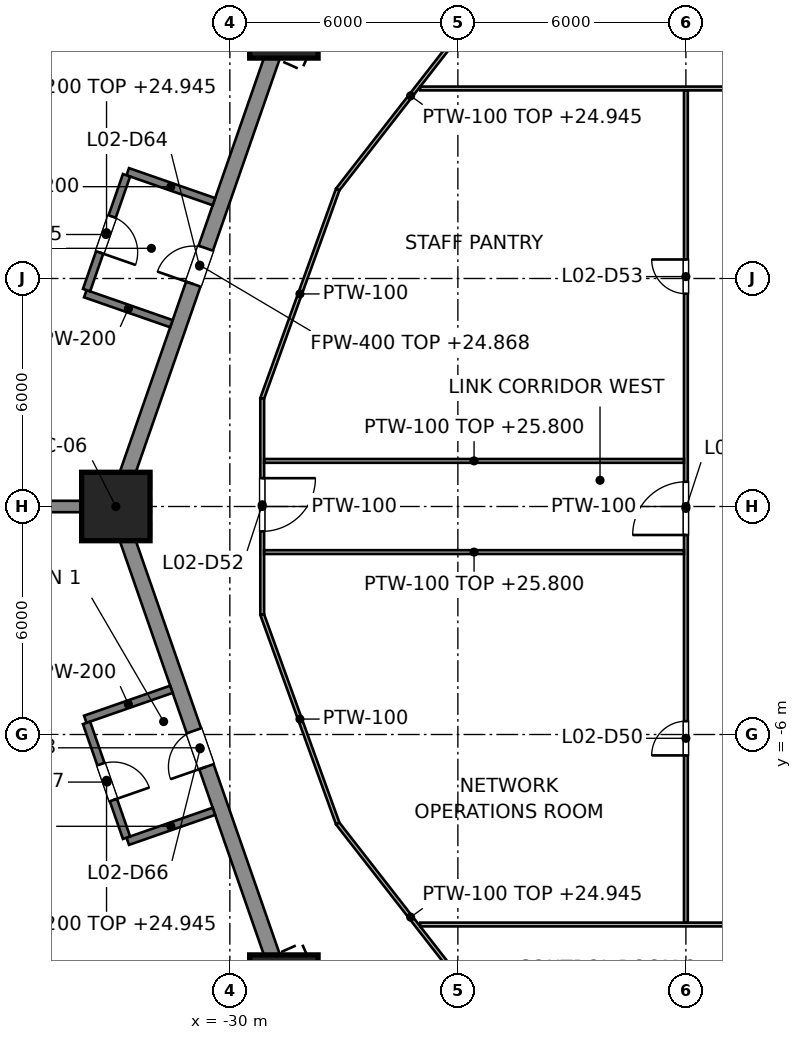
"""IFC4 building model, lengths in metres.
Left out: names, types, materials, properties, quantities, classifications, styles, units other than length and angle.
Written with IfcOpenShell. Run it as: python <this file> out.ifc"""

import sys

from ifc_helpers import new_model, si_unit, direction, frame, frame_2d, origin, origin_2d, place, context, subcontext, project, spatial, rectangle, hollow_rectangle, extrude, element, fill, save


model = new_model("IFC4")
c1 = context("Model", 3, precision=1e-05, world=origin(), true_north=direction((0.0, 1.0)))
c2 = subcontext(c1, "Body", "Model", "MODEL_VIEW")
j1 = project(units=[si_unit("LENGTHUNIT", "METRE"), si_unit("PLANEANGLEUNIT", "RADIAN")], contexts=[c1])
p1 = place(None, origin())
s1 = spatial("IfcSite", under=j1, at=p1, CompositionType="ELEMENT")
p2 = place(p1, origin())
s2 = spatial("IfcBuilding", under=s1, at=p2, CompositionType="ELEMENT")
p3 = place(p2, frame((0.0, 0.0, 17.0)))
s3 = spatial("IfcBuildingStorey", under=s2, at=p3, CompositionType="ELEMENT", Elevation=17.0)
for number, where, z_axis, x_axis in (
    (1, (-28.579, 12.7, 0.0), (0.0, 0.0, 1.0), (-0.914, 0.406, 0.0)),
    (2, (-33.0, 0.0, 0.0), (0.0, 0.0, 1.0), (-1.0, 0.0, 0.0)),
    (3, (-28.579, -12.7, 0.0), (0.0, 0.0, 1.0), (-0.914, -0.406, 0.0)),
):
    element("IfcColumn", number, at=place(p3, frame(where, z_axis=z_axis, x_axis=x_axis)), inside=s3, PredefinedType="COLUMN", context=c2, shape_type="SweptSolid", body=[
        extrude(hollow_rectangle(XDim=1.8, YDim=1.8, WallThickness=0.08, at=origin_2d()), origin(), (0.0, 0.0, 1.0), 9.0),
    ])
p4 = place(p3, frame((-28.579, 12.7, 0.0), z_axis=(0.0, 0.0, 1.0), x_axis=(-0.328770590399, -0.944409815117, 0.0)))
e4 = element("IfcWall", 4, at=p4, inside=s3, PredefinedType="PARTITIONING", context=c2, shape_type="SweptSolid", body=[
    extrude(rectangle(XDim=13.448, YDim=0.4, at=frame_2d((6.724, 0.0))), origin(), (0.0, 0.0, 1.0), 7.868),
])
p5 = place(p4, frame((6.25, 0.0, 0.0)))
e5 = element("IfcOpeningElement", 5, at=p5, cuts=e4, PredefinedType="OPENING", context=c2, shape_type="SweptSolid", body=[
    extrude(rectangle(XDim=1.0, YDim=2.1, at=frame_2d((0.5, 1.05))), frame((0.0, 0.2, 0.0), z_axis=(0.0, -1.0, 0.0), x_axis=(1.0, 0.0, 0.0)), (0.0, 0.0, 1.0), 0.4),
])
p6 = place(p3, frame((-33.0, 0.0, 0.0), z_axis=(0.0, 0.0, 1.0), x_axis=(0.328770590399, -0.944409815117, 0.0)))
e6 = element("IfcWall", 6, at=p6, inside=s3, PredefinedType="PARTITIONING", context=c2, shape_type="SweptSolid", body=[
    extrude(rectangle(XDim=13.448, YDim=0.4, at=frame_2d((6.724, 0.0))), origin(), (0.0, 0.0, 1.0), 7.868),
])
p7 = place(p6, frame((6.25, 0.0, 0.0)))
e7 = element("IfcOpeningElement", 7, at=p7, cuts=e6, PredefinedType="OPENING", context=c2, shape_type="SweptSolid", body=[
    extrude(rectangle(XDim=1.0, YDim=2.1, at=frame_2d((0.5, 1.05))), frame((0.0, 0.2, 0.0), z_axis=(0.0, -1.0, 0.0), x_axis=(1.0, 0.0, 0.0)), (0.0, 0.0, 1.0), 0.4),
])
p8 = place(p3, frame((-23.325, 13.271, 0.0), z_axis=(0.0, 0.0, 1.0), x_axis=(-0.614354540541, -0.78903009988, 0.0)))
e8 = element("IfcWall", 8, at=p8, inside=s3, PredefinedType="PARTITIONING", context=c2, shape_type="SweptSolid", body=[
    extrude(rectangle(XDim=6.246, YDim=0.1, at=frame_2d((3.123, 0.0))), origin(), (0.0, 0.0, 1.0), 7.945),
])
p9 = place(p3, frame((-27.162, 8.343, 0.0), z_axis=(0.0, 0.0, 1.0), x_axis=(-0.339837423604, -0.940484197378, 0.0)))
e9 = element("IfcWall", 9, at=p9, inside=s3, PredefinedType="PARTITIONING", context=c2, shape_type="SweptSolid", body=[
    extrude(rectangle(XDim=5.845, YDim=0.1, at=frame_2d((2.922, 0.0))), origin(), (0.0, 0.0, 1.0), 7.877),
])
p10 = place(p3, frame((-29.148, 2.845, 0.0), z_axis=(0.0, 0.0, 1.0), x_axis=(0.0, -1.0, 0.0)))
e10 = element("IfcWall", 10, at=p10, inside=s3, PredefinedType="PARTITIONING", context=c2, shape_type="SweptSolid", body=[
    extrude(rectangle(XDim=5.691, YDim=0.1, at=frame_2d((2.845, 0.0))), origin(), (0.0, 0.0, 1.0), 7.877),
])
p11 = place(p10, frame((2.1, 0.0, 0.0)))
e11 = element("IfcOpeningElement", 11, at=p11, cuts=e10, PredefinedType="OPENING", context=c2, shape_type="SweptSolid", body=[
    extrude(rectangle(XDim=1.4, YDim=2.1, at=frame_2d((0.7, 1.05))), frame((0.0, 0.05, 0.0), z_axis=(0.0, -1.0, 0.0), x_axis=(1.0, 0.0, 0.0)), (0.0, 0.0, 1.0), 0.1),
])
p12 = place(p3, frame((-29.148, -2.845, 0.0), z_axis=(0.0, 0.0, 1.0), x_axis=(0.339837423604, -0.940484197378, 0.0)))
e12 = element("IfcWall", 12, at=p12, inside=s3, PredefinedType="PARTITIONING", context=c2, shape_type="SweptSolid", body=[
    extrude(rectangle(XDim=5.845, YDim=0.1, at=frame_2d((2.922, 0.0))), origin(), (0.0, 0.0, 1.0), 7.877),
])
p13 = place(p3, frame((-27.162, -8.343, 0.0), z_axis=(0.0, 0.0, 1.0), x_axis=(0.614354540541, -0.78903009988, 0.0)))
e13 = element("IfcWall", 13, at=p13, inside=s3, PredefinedType="PARTITIONING", context=c2, shape_type="SweptSolid", body=[
    extrude(rectangle(XDim=6.246, YDim=0.1, at=frame_2d((3.123, 0.0))), origin(), (0.0, 0.0, 1.0), 7.945),
])
p14 = place(p3, frame((-24.99, 11.0, 0.0), z_axis=(0.0, 0.0, 1.0), x_axis=(1.0, 0.0, 0.0)))
e14 = element("IfcWall", 14, at=p14, inside=s3, PredefinedType="PARTITIONING", context=c2, shape_type="SweptSolid", body=[
    extrude(rectangle(XDim=49.981, YDim=0.1, at=frame_2d((24.99, 0.0))), origin(), (0.0, 0.0, 1.0), 7.877),
])
p15 = place(p14, frame((11.05, 0.0, 0.0)))
e15 = element("IfcOpeningElement", 15, at=p15, cuts=e14, PredefinedType="OPENING", context=c2, shape_type="SweptSolid", body=[
    extrude(rectangle(XDim=0.9, YDim=2.1, at=frame_2d((0.45, 1.05))), frame((0.0, 0.05, 0.0), z_axis=(0.0, -1.0, 0.0), x_axis=(1.0, 0.0, 0.0)), (0.0, 0.0, 1.0), 0.1),
])
p16 = place(p14, frame((19.45, 0.0, 0.0)))
e16 = element("IfcOpeningElement", 16, at=p16, cuts=e14, PredefinedType="OPENING", context=c2, shape_type="SweptSolid", body=[
    extrude(rectangle(XDim=0.9, YDim=2.1, at=frame_2d((0.45, 1.05))), frame((0.0, 0.05, 0.0), z_axis=(0.0, -1.0, 0.0), x_axis=(1.0, 0.0, 0.0)), (0.0, 0.0, 1.0), 0.1),
])
p17 = place(p14, frame((24.3, 0.0, 0.0)))
e17 = element("IfcOpeningElement", 17, at=p17, cuts=e14, PredefinedType="OPENING", context=c2, shape_type="SweptSolid", body=[
    extrude(rectangle(XDim=1.4, YDim=2.1, at=frame_2d((0.7, 1.05))), frame((0.0, 0.05, 0.0), z_axis=(0.0, -1.0, 0.0), x_axis=(1.0, 0.0, 0.0)), (0.0, 0.0, 1.0), 0.1),
])
p18 = place(p14, frame((32.9, 0.0, 0.0)))
e18 = element("IfcOpeningElement", 18, at=p18, cuts=e14, PredefinedType="OPENING", context=c2, shape_type="SweptSolid", body=[
    extrude(rectangle(XDim=0.9, YDim=2.1, at=frame_2d((0.45, 1.05))), frame((0.0, 0.05, 0.0), z_axis=(0.0, -1.0, 0.0), x_axis=(1.0, 0.0, 0.0)), (0.0, 0.0, 1.0), 0.1),
])
p19 = place(p14, frame((41.3, 0.0, 0.0)))
e19 = element("IfcOpeningElement", 19, at=p19, cuts=e14, PredefinedType="OPENING", context=c2, shape_type="SweptSolid", body=[
    extrude(rectangle(XDim=0.9, YDim=2.1, at=frame_2d((0.45, 1.05))), frame((0.0, 0.05, 0.0), z_axis=(0.0, -1.0, 0.0), x_axis=(1.0, 0.0, 0.0)), (0.0, 0.0, 1.0), 0.1),
])
p20 = place(p3, frame((-24.99, -11.0, 0.0), z_axis=(0.0, 0.0, 1.0), x_axis=(1.0, 0.0, 0.0)))
e20 = element("IfcWall", 20, at=p20, inside=s3, PredefinedType="PARTITIONING", context=c2, shape_type="SweptSolid", body=[
    extrude(rectangle(XDim=49.981, YDim=0.1, at=frame_2d((24.99, 0.0))), origin(), (0.0, 0.0, 1.0), 7.877),
])
p21 = place(p20, frame((15.7, 0.0, 0.0)))
e21 = element("IfcOpeningElement", 21, at=p21, cuts=e20, PredefinedType="OPENING", context=c2, shape_type="SweptSolid", body=[
    extrude(rectangle(XDim=0.9, YDim=2.1, at=frame_2d((0.45, 1.05))), frame((0.0, 0.05, 0.0), z_axis=(0.0, -1.0, 0.0), x_axis=(1.0, 0.0, 0.0)), (0.0, 0.0, 1.0), 0.1),
])
p22 = place(p20, frame((24.3, 0.0, 0.0)))
e22 = element("IfcOpeningElement", 22, at=p22, cuts=e20, PredefinedType="OPENING", context=c2, shape_type="SweptSolid", body=[
    extrude(rectangle(XDim=1.4, YDim=2.1, at=frame_2d((0.7, 1.05))), frame((0.0, 0.05, 0.0), z_axis=(0.0, -1.0, 0.0), x_axis=(1.0, 0.0, 0.0)), (0.0, 0.0, 1.0), 0.1),
])
p23 = place(p20, frame((30.65, 0.0, 0.0)))
e23 = element("IfcOpeningElement", 23, at=p23, cuts=e20, PredefinedType="OPENING", context=c2, shape_type="SweptSolid", body=[
    extrude(rectangle(XDim=0.9, YDim=2.1, at=frame_2d((0.45, 1.05))), frame((0.0, 0.05, 0.0), z_axis=(0.0, -1.0, 0.0), x_axis=(1.0, 0.0, 0.0)), (0.0, 0.0, 1.0), 0.1),
])
p24 = place(p20, frame((39.05, 0.0, 0.0)))
e24 = element("IfcOpeningElement", 24, at=p24, cuts=e20, PredefinedType="OPENING", context=c2, shape_type="SweptSolid", body=[
    extrude(rectangle(XDim=0.9, YDim=2.1, at=frame_2d((0.45, 1.05))), frame((0.0, 0.05, 0.0), z_axis=(0.0, -1.0, 0.0), x_axis=(1.0, 0.0, 0.0)), (0.0, 0.0, 1.0), 0.1),
])
p25 = place(p3, frame((-18.0, -10.95, 0.0), z_axis=(0.0, 0.0, 1.0), x_axis=(0.0, 1.0, 0.0)))
e25 = element("IfcWall", 25, at=p25, inside=s3, PredefinedType="PARTITIONING", context=c2, shape_type="SweptSolid", body=[
    extrude(rectangle(XDim=21.9, YDim=0.1, at=frame_2d((10.95, 0.0))), origin(), (0.0, 0.0, 1.0), 7.877),
])
p26 = place(p25, frame((4.4, 0.0, 0.0)))
e26 = element("IfcOpeningElement", 26, at=p26, cuts=e25, PredefinedType="OPENING", context=c2, shape_type="SweptSolid", body=[
    extrude(rectangle(XDim=0.9, YDim=2.1, at=frame_2d((0.45, 1.05))), frame((0.0, 0.05, 0.0), z_axis=(0.0, -1.0, 0.0), x_axis=(1.0, 0.0, 0.0)), (0.0, 0.0, 1.0), 0.1),
])
p27 = place(p25, frame((10.2, 0.0, 0.0)))
e27 = element("IfcOpeningElement", 27, at=p27, cuts=e25, PredefinedType="OPENING", context=c2, shape_type="SweptSolid", body=[
    extrude(rectangle(XDim=1.4, YDim=2.1, at=frame_2d((0.7, 1.05))), frame((0.0, 0.05, 0.0), z_axis=(0.0, -1.0, 0.0), x_axis=(1.0, 0.0, 0.0)), (0.0, 0.0, 1.0), 0.1),
])
p28 = place(p25, frame((16.55, 0.0, 0.0)))
e28 = element("IfcOpeningElement", 28, at=p28, cuts=e25, PredefinedType="OPENING", context=c2, shape_type="SweptSolid", body=[
    extrude(rectangle(XDim=0.9, YDim=2.1, at=frame_2d((0.45, 1.05))), frame((0.0, 0.05, 0.0), z_axis=(0.0, -1.0, 0.0), x_axis=(1.0, 0.0, 0.0)), (0.0, 0.0, 1.0), 0.1),
])
for number, where, z_axis, x_axis in (
    (29, (-18.05, -1.2, 0.0), (0.0, 0.0, 1.0), (-1.0, 0.0, 0.0)),
    (30, (-18.05, 1.2, 0.0), (0.0, 0.0, 1.0), (-1.0, 0.0, 0.0)),
):
    element("IfcWall", number, at=place(p3, frame(where, z_axis=z_axis, x_axis=x_axis)), inside=s3, PredefinedType="PARTITIONING", context=c2, shape_type="SweptSolid", body=[
        extrude(rectangle(XDim=11.048, YDim=0.1, at=frame_2d((5.524, 0.0))), origin(), (0.0, 0.0, 1.0), 8.8),
    ])
p29 = place(p3, frame((-33.2, 0.0, 0.0), z_axis=(0.0, 0.0, 1.0), x_axis=(-1.0, 0.0, 0.0)))
e31 = element("IfcWall", 31, at=p29, inside=s3, PredefinedType="PARTITIONING", context=c2, shape_type="SweptSolid", body=[
    extrude(rectangle(XDim=14.598, YDim=0.3, at=frame_2d((7.299, 0.0))), origin(), (0.0, 0.0, 1.0), 8.026),
])
for number, where, z_axis, x_axis in (
    (32, (-30.419, 8.021, 0.0), (0.0, 0.0, 1.0), (-0.944, 0.329, 0.0)),
    (33, (-31.537, 4.81, 0.0), (0.0, 0.0, 1.0), (-0.944, 0.329, 0.0)),
):
    element("IfcWall", number, at=place(p3, frame(where, z_axis=z_axis, x_axis=x_axis)), inside=s3, PredefinedType="PARTITIONING", context=c2, shape_type="SweptSolid", body=[
        extrude(rectangle(XDim=2.4, YDim=0.2, at=frame_2d((1.2, 0.0))), origin(), (0.0, 0.0, 1.0), 8.8),
    ])
p30 = place(p3, frame((-32.719, 8.716, 0.0), z_axis=(0.0, 0.0, 1.0), x_axis=(-0.328742544754, -0.944419577978, 0.0)))
e34 = element("IfcWall", 34, at=p30, inside=s3, PredefinedType="PARTITIONING", context=c2, shape_type="SweptSolid", body=[
    extrude(rectangle(XDim=3.2, YDim=0.2, at=frame_2d((1.6, 0.0))), origin(), (0.0, 0.0, 1.0), 7.945),
])
p31 = place(p30, frame((1.15, 0.0, 0.0)))
e35 = element("IfcOpeningElement", 35, at=p31, cuts=e34, PredefinedType="OPENING", context=c2, shape_type="SweptSolid", body=[
    extrude(rectangle(XDim=1.0, YDim=2.1, at=frame_2d((0.5, 1.05))), frame((0.0, 0.1, 0.0), z_axis=(0.0, -1.0, 0.0), x_axis=(1.0, 0.0, 0.0)), (0.0, 0.0, 1.0), 0.2),
])
for number, where, z_axis, x_axis in (
    (36, (-31.537, -4.81, 0.0), (0.0, 0.0, 1.0), (-0.944, -0.329, 0.0)),
    (37, (-30.419, -8.021, 0.0), (0.0, 0.0, 1.0), (-0.944, -0.329, 0.0)),
):
    element("IfcWall", number, at=place(p3, frame(where, z_axis=z_axis, x_axis=x_axis)), inside=s3, PredefinedType="PARTITIONING", context=c2, shape_type="SweptSolid", body=[
        extrude(rectangle(XDim=2.4, YDim=0.2, at=frame_2d((1.2, 0.0))), origin(), (0.0, 0.0, 1.0), 8.8),
    ])
p32 = place(p3, frame((-33.771, -5.694, 0.0), z_axis=(0.0, 0.0, 1.0), x_axis=(0.328742544754, -0.944419577978, 0.0)))
e38 = element("IfcWall", 38, at=p32, inside=s3, PredefinedType="PARTITIONING", context=c2, shape_type="SweptSolid", body=[
    extrude(rectangle(XDim=3.2, YDim=0.2, at=frame_2d((1.6, 0.0))), origin(), (0.0, 0.0, 1.0), 7.945),
])
p33 = place(p32, frame((1.15, 0.0, 0.0)))
e39 = element("IfcOpeningElement", 39, at=p33, cuts=e38, PredefinedType="OPENING", context=c2, shape_type="SweptSolid", body=[
    extrude(rectangle(XDim=1.0, YDim=2.1, at=frame_2d((0.5, 1.05))), frame((0.0, 0.1, 0.0), z_axis=(0.0, -1.0, 0.0), x_axis=(1.0, 0.0, 0.0)), (0.0, 0.0, 1.0), 0.2),
])
p34 = place(p26, origin())
e40 = element("IfcDoor", 40, at=p34, inside=s3, OperationType="SINGLE_SWING_LEFT", PredefinedType="DOOR", context=c2, shape_type="SweptSolid", body=[
    extrude(rectangle(XDim=0.9, YDim=2.1, at=frame_2d((0.45, 1.05))), frame((0.0, 0.025, 0.0), z_axis=(0.0, -1.0, 0.0), x_axis=(1.0, 0.0, 0.0)), (0.0, 0.0, 1.0), 0.05),
])
fill(e26, e40)
p35 = place(p27, origin())
e41 = element("IfcDoor", 41, at=p35, inside=s3, OperationType="SINGLE_SWING_LEFT", PredefinedType="DOOR", context=c2, shape_type="SweptSolid", body=[
    extrude(rectangle(XDim=1.4, YDim=2.1, at=frame_2d((0.7, 1.05))), frame((0.0, 0.025, 0.0), z_axis=(0.0, -1.0, 0.0), x_axis=(1.0, 0.0, 0.0)), (0.0, 0.0, 1.0), 0.05),
])
fill(e27, e41)
p36 = place(p11, origin())
e42 = element("IfcDoor", 42, at=p36, inside=s3, OperationType="SINGLE_SWING_LEFT", PredefinedType="DOOR", context=c2, shape_type="SweptSolid", body=[
    extrude(rectangle(XDim=1.4, YDim=2.1, at=frame_2d((0.7, 1.05))), frame((0.0, 0.025, 0.0), z_axis=(0.0, -1.0, 0.0), x_axis=(1.0, 0.0, 0.0)), (0.0, 0.0, 1.0), 0.05),
])
fill(e11, e42)
p37 = place(p28, origin())
e43 = element("IfcDoor", 43, at=p37, inside=s3, OperationType="SINGLE_SWING_RIGHT", PredefinedType="DOOR", context=c2, shape_type="SweptSolid", body=[
    extrude(rectangle(XDim=0.9, YDim=2.1, at=frame_2d((0.45, 1.05))), frame((0.0, 0.025, 0.0), z_axis=(0.0, -1.0, 0.0), x_axis=(1.0, 0.0, 0.0)), (0.0, 0.0, 1.0), 0.05),
])
fill(e28, e43)
p38 = place(p5, origin())
e44 = element("IfcDoor", 44, at=p38, inside=s3, OperationType="SINGLE_SWING_RIGHT", PredefinedType="DOOR", context=c2, shape_type="SweptSolid", body=[
    extrude(rectangle(XDim=1.0, YDim=2.1, at=frame_2d((0.5, 1.05))), frame((0.0, 0.025, 0.0), z_axis=(0.0, -1.0, 0.0), x_axis=(1.0, 0.0, 0.0)), (0.0, 0.0, 1.0), 0.05),
])
fill(e5, e44)
p39 = place(p31, origin())
e45 = element("IfcDoor", 45, at=p39, inside=s3, OperationType="SINGLE_SWING_RIGHT", PredefinedType="DOOR", context=c2, shape_type="SweptSolid", body=[
    extrude(rectangle(XDim=1.0, YDim=2.1, at=frame_2d((0.5, 1.05))), frame((0.0, 0.025, 0.0), z_axis=(0.0, -1.0, 0.0), x_axis=(1.0, 0.0, 0.0)), (0.0, 0.0, 1.0), 0.05),
])
fill(e35, e45)
p40 = place(p7, origin())
e46 = element("IfcDoor", 46, at=p40, inside=s3, OperationType="SINGLE_SWING_RIGHT", PredefinedType="DOOR", context=c2, shape_type="SweptSolid", body=[
    extrude(rectangle(XDim=1.0, YDim=2.1, at=frame_2d((0.5, 1.05))), frame((0.0, 0.025, 0.0), z_axis=(0.0, -1.0, 0.0), x_axis=(1.0, 0.0, 0.0)), (0.0, 0.0, 1.0), 0.05),
])
fill(e7, e46)
p41 = place(p33, origin())
e47 = element("IfcDoor", 47, at=p41, inside=s3, OperationType="SINGLE_SWING_RIGHT", PredefinedType="DOOR", context=c2, shape_type="SweptSolid", body=[
    extrude(rectangle(XDim=1.0, YDim=2.1, at=frame_2d((0.5, 1.05))), frame((0.0, 0.025, 0.0), z_axis=(0.0, -1.0, 0.0), x_axis=(1.0, 0.0, 0.0)), (0.0, 0.0, 1.0), 0.05),
])
fill(e39, e47)
save(model, sys.argv[1])
